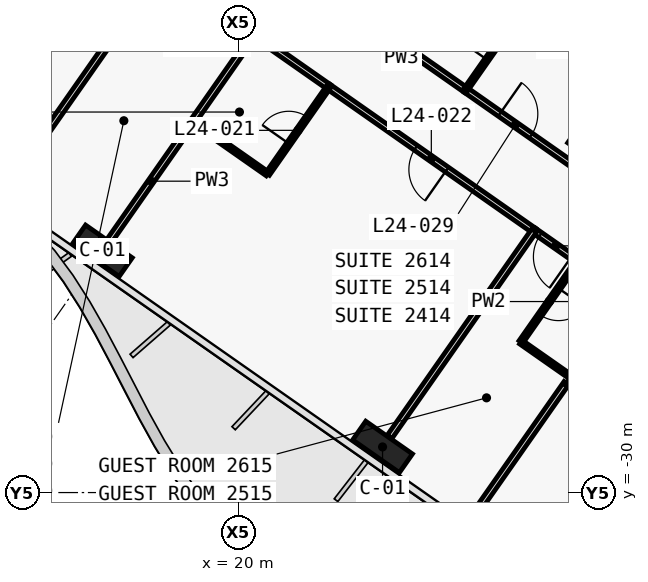
"""IFC4 building model, lengths in metres.
Left out: names, types, materials, properties, quantities, classifications, styles, units other than length and angle.
Written with IfcOpenShell. Run it as: python <this file> out.ifc"""

import sys

from ifc_helpers import new_model, si_unit, direction, frame, frame_2d, origin, origin_2d, place, context, subcontext, project, spatial, rectangle, extrude, element, fill, save


model = new_model("IFC4")
c1 = context("Model", 3, precision=1e-05, world=origin(), true_north=direction((0.0, 1.0)))
c2 = subcontext(c1, "Body", "Model", "MODEL_VIEW")
j1 = project(units=[si_unit("LENGTHUNIT", "METRE"), si_unit("PLANEANGLEUNIT", "RADIAN")], contexts=[c1])
p1 = place(None, origin())
s1 = spatial("IfcSite", under=j1, at=p1, CompositionType="ELEMENT")
p2 = place(p1, origin())
s2 = spatial("IfcBuilding", under=s1, at=p2, CompositionType="ELEMENT")
p3 = place(p2, frame((0.0, 0.0, 112.1)))
s3 = spatial("IfcBuildingStorey", under=s2, at=p3, CompositionType="ELEMENT", Elevation=112.1)
for number, where, z_axis, x_axis in (
    (1, (16.41, -23.637, 0.0), (0.0, 0.0, 1.0), (0.819, -0.574, 0.0)),
    (2, (23.782, -28.799, 0.0), (0.0, 0.0, 1.0), (0.819, -0.574, 0.0)),
):
    element("IfcColumn", number, at=place(p3, frame(where, z_axis=z_axis, x_axis=x_axis)), inside=s3, PredefinedType="COLUMN", context=c2, shape_type="SweptSolid", body=[
        extrude(rectangle(XDim=1.5, YDim=0.6, at=origin_2d()), origin(), (0.0, 0.0, 1.0), 3.6),
    ])
p4 = place(p3, frame((29.49, -20.649, 0.0), z_axis=(0.0, 0.0, 1.0), x_axis=(0.819152044289, -0.573576436351, 0.0)))
e3 = element("IfcColumn", 3, at=p4, inside=s3, PredefinedType="COLUMN", context=c2, shape_type="SweptSolid", body=[
    extrude(rectangle(XDim=1.2, YDim=1.2, at=origin_2d()), origin(), (0.0, 0.0, 1.0), 3.6),
])
p5 = place(p3, frame((25.966, -19.403, 0.0), z_axis=(0.0, 0.0, 1.0), x_axis=(0.81917779803, -0.57353965444, 0.0)))
e4 = element("IfcWall", 4, at=p5, inside=s3, PredefinedType="PARTITIONING", context=c2, shape_type="SweptSolid", body=[
    extrude(rectangle(XDim=3.603, YDim=0.15, at=frame_2d((1.801, 0.0))), origin(), (0.0, 0.0, 1.0), 2.6),
])
p6 = place(p5, frame((1.101, 0.0, 0.0)))
e5 = element("IfcOpeningElement", 5, at=p6, cuts=e4, PredefinedType="OPENING", context=c2, shape_type="SweptSolid", body=[
    extrude(rectangle(XDim=1.0, YDim=2.1, at=frame_2d((0.5, 1.05))), frame((0.0, 0.085, 0.0), z_axis=(0.0, -1.0, 0.0), x_axis=(1.0, 0.0, 0.0)), (0.0, 0.0, 1.0), 0.17),
])
p7 = place(p3, frame((23.999, -18.025, 0.0), z_axis=(0.0, 0.0, 1.0), x_axis=(0.819146032251, -0.573585022335, 0.0)))
e6 = element("IfcWall", 6, at=p7, inside=s3, PredefinedType="PARTITIONING", context=c2, shape_type="SweptSolid", body=[
    extrude(rectangle(XDim=2.404, YDim=0.15, at=frame_2d((1.202, 0.0))), origin(), (0.0, 0.0, 1.0), 3.32),
])
p8 = place(p3, frame((27.771, -23.107, 0.0), z_axis=(0.0, 0.0, 1.0), x_axis=(-0.819153746897, 0.573574004767, 0.0)))
e7 = element("IfcWall", 7, at=p8, inside=s3, PredefinedType="PARTITIONING", context=c2, shape_type="SweptSolid", body=[
    extrude(rectangle(XDim=6.603, YDim=0.15, at=frame_2d((3.302, 0.0))), origin(), (0.0, 0.0, 1.0), 2.6),
])
p9 = place(p8, frame((2.802, 0.0, 0.0)))
e8 = element("IfcOpeningElement", 8, at=p9, cuts=e7, PredefinedType="OPENING", context=c2, shape_type="SweptSolid", body=[
    extrude(rectangle(XDim=1.0, YDim=2.1, at=frame_2d((0.5, 1.05))), frame((0.0, 0.085, 0.0), z_axis=(0.0, -1.0, 0.0), x_axis=(1.0, 0.0, 0.0)), (0.0, 0.0, 1.0), 0.17),
])
p10 = place(p3, frame((22.364, -19.322, 0.0), z_axis=(0.0, 0.0, 1.0), x_axis=(-0.819146032251, 0.573585022335, 0.0)))
e9 = element("IfcWall", 9, at=p10, inside=s3, PredefinedType="PARTITIONING", context=c2, shape_type="SweptSolid", body=[
    extrude(rectangle(XDim=2.404, YDim=0.15, at=frame_2d((1.202, 0.0))), origin(), (0.0, 0.0, 1.0), 2.6),
])
p11 = place(p3, frame((28.917, -23.91, 0.0), z_axis=(0.0, 0.0, 1.0), x_axis=(-0.819117471667, 0.573625808005, 0.0)))
e10 = element("IfcWall", 10, at=p11, inside=s3, PredefinedType="PARTITIONING", context=c2, shape_type="SweptSolid", body=[
    extrude(rectangle(XDim=1.403, YDim=0.15, at=frame_2d((0.702, 0.0))), origin(), (0.0, 0.0, 1.0), 2.6),
])
p12 = place(p11, frame((0.201, 0.0, 0.0)))
e11 = element("IfcOpeningElement", 11, at=p12, cuts=e10, PredefinedType="OPENING", context=c2, shape_type="SweptSolid", body=[
    extrude(rectangle(XDim=1.0, YDim=2.1, at=frame_2d((0.5, 1.05))), frame((0.0, 0.085, 0.0), z_axis=(0.0, -1.0, 0.0), x_axis=(1.0, 0.0, 0.0)), (0.0, 0.0, 1.0), 0.17),
])
p13 = place(p3, frame((25.968, -19.404, 0.0), z_axis=(0.0, 0.0, 1.0), x_axis=(0.573591086599, 0.819141785879, 0.0)))
e12 = element("IfcWall", 12, at=p13, inside=s3, PredefinedType="PARTITIONING", context=c2, shape_type="SweptSolid", body=[
    extrude(rectangle(XDim=2.8, YDim=0.12, at=frame_2d((1.4, 0.0))), origin(), (0.0, 0.0, 1.0), 2.6),
])
p14 = place(p13, frame((0.975, 0.0, 0.0)))
e13 = element("IfcOpeningElement", 13, at=p14, cuts=e12, PredefinedType="OPENING", context=c2, shape_type="SweptSolid", body=[
    extrude(rectangle(XDim=0.85, YDim=2.05, at=frame_2d((0.425, 1.025))), frame((0.0, 0.07, 0.0), z_axis=(0.0, -1.0, 0.0), x_axis=(1.0, 0.0, 0.0)), (0.0, 0.0, 1.0), 0.14),
])
p15 = place(p3, frame((17.939, -16.223, 0.0), z_axis=(0.0, 0.0, 1.0), x_axis=(-0.573594765376, -0.819139209862, 0.0)))
e14 = element("IfcWall", 14, at=p15, inside=s3, PredefinedType="PARTITIONING", context=c2, shape_type="SweptSolid", body=[
    extrude(rectangle(XDim=7.3, YDim=0.15, at=frame_2d((3.65, 0.0))), origin(), (0.0, 0.0, 1.0), 2.5),
])
p16 = place(p3, frame((18.791, -20.237, 0.0), z_axis=(0.0, 0.0, 1.0), x_axis=(-0.57359919792, -0.819136105995, 0.0)))
e15 = element("IfcWall", 15, at=p16, inside=s3, PredefinedType="PARTITIONING", context=c2, shape_type="SweptSolid", body=[
    extrude(rectangle(XDim=3.831, YDim=0.15, at=frame_2d((1.916, 0.0))), origin(), (0.0, 0.0, 1.0), 2.6),
])
p17 = place(p3, frame((20.396, -17.944, 0.0), z_axis=(0.0, 0.0, 1.0), x_axis=(-0.573596837309, -0.819137759006, 0.0)))
e16 = element("IfcWall", 16, at=p17, inside=s3, PredefinedType="PARTITIONING", context=c2, shape_type="SweptSolid", body=[
    extrude(rectangle(XDim=2.802, YDim=0.15, at=frame_2d((1.401, 0.0))), origin(), (0.0, 0.0, 1.0), 2.6),
])
p18 = place(p3, frame((18.79, -20.239, 0.0), z_axis=(0.0, 0.0, 1.0), x_axis=(0.819188907105, -0.573523787192, 0.0)))
e17 = element("IfcWall", 17, at=p18, inside=s3, PredefinedType="PARTITIONING", context=c2, shape_type="SweptSolid", body=[
    extrude(rectangle(XDim=2.4, YDim=0.12, at=frame_2d((1.2, 0.0))), origin(), (0.0, 0.0, 1.0), 2.6),
])
p19 = place(p3, frame((20.757, -21.615, 0.0), z_axis=(0.0, 0.0, 1.0), x_axis=(0.57364959175, 0.819100815459, 0.0)))
e18 = element("IfcWall", 18, at=p19, inside=s3, PredefinedType="PARTITIONING", context=c2, shape_type="SweptSolid", body=[
    extrude(rectangle(XDim=2.8, YDim=0.12, at=frame_2d((1.4, 0.0))), origin(), (0.0, 0.0, 1.0), 3.32),
])
p20 = place(p19, frame((0.975, 0.0, 0.0)))
e19 = element("IfcOpeningElement", 19, at=p20, cuts=e18, PredefinedType="OPENING", context=c2, shape_type="SweptSolid", body=[
    extrude(rectangle(XDim=0.85, YDim=2.05, at=frame_2d((0.425, 1.025))), frame((0.0, 0.07, 0.0), z_axis=(0.0, -1.0, 0.0), x_axis=(1.0, 0.0, 0.0)), (0.0, 0.0, 1.0), 0.14),
])
p21 = place(p3, frame((27.769, -23.106, 0.0), z_axis=(0.0, 0.0, 1.0), x_axis=(-0.57359826181, -0.819136761505, 0.0)))
e20 = element("IfcWall", 20, at=p21, inside=s3, PredefinedType="PARTITIONING", context=c2, shape_type="SweptSolid", body=[
    extrude(rectangle(XDim=6.63, YDim=0.15, at=frame_2d((3.315, 0.0))), origin(), (0.0, 0.0, 1.0), 2.6),
])
p22 = place(p3, frame((28.915, -23.909, 0.0), z_axis=(0.0, 0.0, 1.0), x_axis=(-0.573645091666, -0.819103967032, 0.0)))
e21 = element("IfcWall", 21, at=p22, inside=s3, PredefinedType="PARTITIONING", context=c2, shape_type="SweptSolid", body=[
    extrude(rectangle(XDim=2.6, YDim=0.12, at=frame_2d((1.3, 0.0))), origin(), (0.0, 0.0, 1.0), 3.32),
])
p23 = place(p22, frame((0.875, 0.0, 0.0)))
e22 = element("IfcOpeningElement", 22, at=p23, cuts=e21, PredefinedType="OPENING", context=c2, shape_type="SweptSolid", body=[
    extrude(rectangle(XDim=0.85, YDim=2.05, at=frame_2d((0.425, 1.025))), frame((0.0, 0.07, 0.0), z_axis=(0.0, -1.0, 0.0), x_axis=(1.0, 0.0, 0.0)), (0.0, 0.0, 1.0), 0.14),
])
p24 = place(p3, frame((27.424, -26.04, 0.0), z_axis=(0.0, 0.0, 1.0), x_axis=(0.81918174131, -0.573534022273, 0.0)))
e23 = element("IfcWall", 23, at=p24, inside=s3, PredefinedType="PARTITIONING", context=c2, shape_type="SweptSolid", body=[
    extrude(rectangle(XDim=1.6, YDim=0.12, at=frame_2d((0.8, 0.0))), origin(), (0.0, 0.0, 1.0), 3.32),
])
p25 = place(p3, frame((28.621, -27.12, 0.0), z_axis=(0.0, 0.0, 1.0), x_axis=(-0.573593387921, -0.81914017441, 0.0)))
e24 = element("IfcWall", 24, at=p25, inside=s3, PredefinedType="PARTITIONING", context=c2, shape_type="SweptSolid", body=[
    extrude(rectangle(XDim=4.501, YDim=0.15, at=frame_2d((2.25, 0.0))), origin(), (0.0, 0.0, 1.0), 2.5),
])
p26 = place(p3, frame((28.62, -27.121, 0.0), z_axis=(0.0, 0.0, 1.0), x_axis=(0.819141114317, -0.573592045652, 0.0)))
e25 = element("IfcWall", 25, at=p26, inside=s3, PredefinedType="PARTITIONING", context=c2, shape_type="SweptSolid", body=[
    extrude(rectangle(XDim=2.4, YDim=0.12, at=frame_2d((1.2, 0.0))), origin(), (0.0, 0.0, 1.0), 3.32),
])
p27 = place(p20, origin())
e26 = element("IfcDoor", 26, at=p27, inside=s3, OperationType="SINGLE_SWING_LEFT", PredefinedType="DOOR", context=c2, shape_type="SweptSolid", body=[
    extrude(rectangle(XDim=0.85, YDim=2.05, at=frame_2d((0.425, 1.025))), frame((0.0, 0.025, 0.0), z_axis=(0.0, -1.0, 0.0), x_axis=(1.0, 0.0, 0.0)), (0.0, 0.0, 1.0), 0.05),
])
fill(e19, e26)
p28 = place(p9, origin())
e27 = element("IfcDoor", 27, at=p28, inside=s3, OperationType="SINGLE_SWING_LEFT", PredefinedType="DOOR", context=c2, shape_type="SweptSolid", body=[
    extrude(rectangle(XDim=1.0, YDim=2.1, at=frame_2d((0.5, 1.05))), frame((0.0, 0.025, 0.0), z_axis=(0.0, -1.0, 0.0), x_axis=(1.0, 0.0, 0.0)), (0.0, 0.0, 1.0), 0.05),
])
fill(e8, e27)
p29 = place(p23, origin())
e28 = element("IfcDoor", 28, at=p29, inside=s3, OperationType="SINGLE_SWING_RIGHT", PredefinedType="DOOR", context=c2, shape_type="SweptSolid", body=[
    extrude(rectangle(XDim=0.85, YDim=2.05, at=frame_2d((0.425, 1.025))), frame((0.0, 0.025, 0.0), z_axis=(0.0, -1.0, 0.0), x_axis=(1.0, 0.0, 0.0)), (0.0, 0.0, 1.0), 0.05),
])
fill(e22, e28)
p30 = place(p12, origin())
e29 = element("IfcDoor", 29, at=p30, inside=s3, OperationType="SINGLE_SWING_LEFT", PredefinedType="DOOR", context=c2, shape_type="SweptSolid", body=[
    extrude(rectangle(XDim=1.0, YDim=2.1, at=frame_2d((0.5, 1.05))), frame((0.0, 0.025, 0.0), z_axis=(0.0, -1.0, 0.0), x_axis=(1.0, 0.0, 0.0)), (0.0, 0.0, 1.0), 0.05),
])
fill(e11, e29)
p31 = place(p14, origin())
e30 = element("IfcDoor", 30, at=p31, inside=s3, OperationType="SINGLE_SWING_RIGHT", PredefinedType="DOOR", context=c2, shape_type="SweptSolid", body=[
    extrude(rectangle(XDim=0.85, YDim=2.05, at=frame_2d((0.425, 1.025))), frame((0.0, 0.025, 0.0), z_axis=(0.0, -1.0, 0.0), x_axis=(1.0, 0.0, 0.0)), (0.0, 0.0, 1.0), 0.05),
])
fill(e13, e30)
p32 = place(p6, origin())
e31 = element("IfcDoor", 31, at=p32, inside=s3, OperationType="SINGLE_SWING_LEFT", PredefinedType="DOOR", context=c2, shape_type="SweptSolid", body=[
    extrude(rectangle(XDim=1.0, YDim=2.1, at=frame_2d((0.5, 1.05))), frame((0.0, 0.025, 0.0), z_axis=(0.0, -1.0, 0.0), x_axis=(1.0, 0.0, 0.0)), (0.0, 0.0, 1.0), 0.05),
])
fill(e5, e31)
save(model, sys.argv[1])
